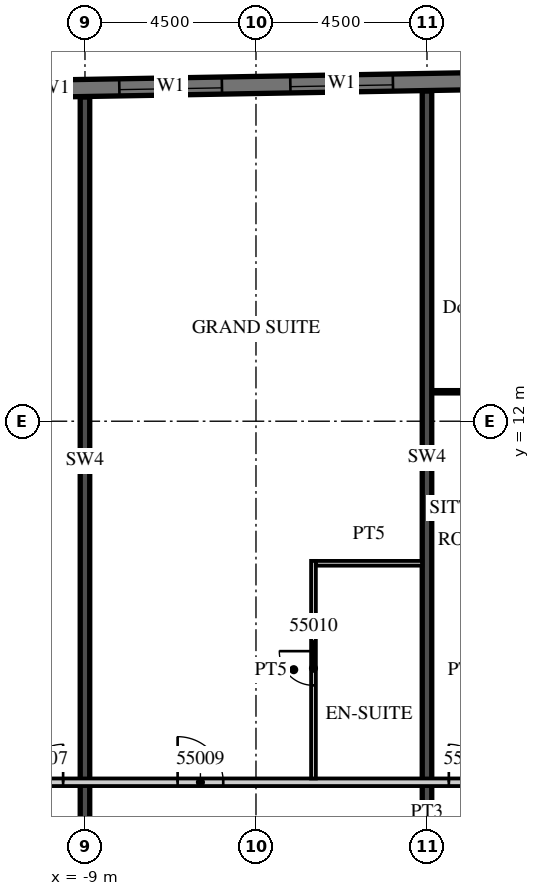
"""IFC4 building model, lengths in metres.
Left out: names, types, materials, properties, quantities, classifications, styles, units other than length and angle.
Written with IfcOpenShell. Run it as: python <this file> out.ifc"""

import sys

from ifc_helpers import new_model, si_unit, direction, frame, frame_2d, origin, place, context, subcontext, project, spatial, rectangle, extrude, element, fill, save


model = new_model("IFC4")
c1 = context("Model", 3, precision=1e-05, world=origin(), true_north=direction((0.0, 1.0)))
c2 = subcontext(c1, "Body", "Model", "MODEL_VIEW")
j1 = project(units=[si_unit("LENGTHUNIT", "METRE"), si_unit("PLANEANGLEUNIT", "RADIAN")], contexts=[c1])
p1 = place(None, origin())
s1 = spatial("IfcSite", under=j1, at=p1, CompositionType="ELEMENT")
p2 = place(p1, origin())
s2 = spatial("IfcBuilding", under=s1, at=p2, CompositionType="ELEMENT")
p3 = place(p2, frame((0.0, 0.0, 227.6)))
s3 = spatial("IfcBuildingStorey", under=s2, at=p3, CompositionType="ELEMENT", Elevation=227.6)
p4 = place(p3, frame((-9.0, 1.4, 0.0), z_axis=(0.0, 0.0, 1.0), x_axis=(0.0, 1.0, 0.0)))
e1 = element("IfcWall", 1, at=p4, inside=s3, PredefinedType="SHEAR", context=c2, shape_type="SweptSolid", body=[
    extrude(rectangle(XDim=19.132, YDim=0.25, at=frame_2d((9.566, 0.0))), origin(), (0.0, 0.0, 1.0), 3.3),
])
p5 = place(p3, frame((0.0, 1.4, 0.0), z_axis=(0.0, 0.0, 1.0), x_axis=(0.0, 1.0, 0.0)))
e2 = element("IfcWall", 2, at=p5, inside=s3, PredefinedType="SHEAR", context=c2, shape_type="SweptSolid", body=[
    extrude(rectangle(XDim=19.289, YDim=0.25, at=frame_2d((9.644, 0.0))), origin(), (0.0, 0.0, 1.0), 3.3),
])
p6 = place(p3, frame((13.504, 21.161, 0.0), z_axis=(0.0, 0.0, 1.0), x_axis=(-0.999847763257, -0.017448504532, 0.0)))
e3 = element("IfcWall", 3, at=p6, inside=s3, PredefinedType="SOLIDWALL", context=c2, shape_type="SweptSolid", body=[
    extrude(rectangle(XDim=46.859, YDim=0.45, at=frame_2d((23.43, 0.0))), origin(), (0.0, 0.0, 1.0), 3.02),
])
p7 = place(p6, frame((0.9, 0.0, 0.45)))
e4 = element("IfcOpeningElement", 4, at=p7, cuts=e3, PredefinedType="OPENING", context=c2, shape_type="SweptSolid", body=[
    extrude(rectangle(XDim=2.7, YDim=2.25, at=frame_2d((1.35, 1.125))), frame((0.0, 0.235, 0.0), z_axis=(0.0, -1.0, 0.0), x_axis=(1.0, 0.0, 0.0)), (0.0, 0.0, 1.0), 0.47),
])
p8 = place(p6, frame((5.401, 0.0, 0.45)))
e5 = element("IfcOpeningElement", 5, at=p8, cuts=e3, PredefinedType="OPENING", context=c2, shape_type="SweptSolid", body=[
    extrude(rectangle(XDim=2.7, YDim=2.25, at=frame_2d((1.35, 1.125))), frame((0.0, 0.235, 0.0), z_axis=(0.0, -1.0, 0.0), x_axis=(1.0, 0.0, 0.0)), (0.0, 0.0, 1.0), 0.47),
])
p9 = place(p6, frame((9.902, 0.0, 0.45)))
e6 = element("IfcOpeningElement", 6, at=p9, cuts=e3, PredefinedType="OPENING", context=c2, shape_type="SweptSolid", body=[
    extrude(rectangle(XDim=2.7, YDim=2.25, at=frame_2d((1.35, 1.125))), frame((0.0, 0.235, 0.0), z_axis=(0.0, -1.0, 0.0), x_axis=(1.0, 0.0, 0.0)), (0.0, 0.0, 1.0), 0.47),
])
p10 = place(p6, frame((14.402, 0.0, 0.45)))
e7 = element("IfcOpeningElement", 7, at=p10, cuts=e3, PredefinedType="OPENING", context=c2, shape_type="SweptSolid", body=[
    extrude(rectangle(XDim=2.7, YDim=2.25, at=frame_2d((1.35, 1.125))), frame((0.0, 0.235, 0.0), z_axis=(0.0, -1.0, 0.0), x_axis=(1.0, 0.0, 0.0)), (0.0, 0.0, 1.0), 0.47),
])
p11 = place(p6, frame((18.903, 0.0, 0.45)))
e8 = element("IfcOpeningElement", 8, at=p11, cuts=e3, PredefinedType="OPENING", context=c2, shape_type="SweptSolid", body=[
    extrude(rectangle(XDim=2.7, YDim=2.25, at=frame_2d((1.35, 1.125))), frame((0.0, 0.235, 0.0), z_axis=(0.0, -1.0, 0.0), x_axis=(1.0, 0.0, 0.0)), (0.0, 0.0, 1.0), 0.47),
])
p12 = place(p6, frame((23.404, 0.0, 0.45)))
e9 = element("IfcOpeningElement", 9, at=p12, cuts=e3, PredefinedType="OPENING", context=c2, shape_type="SweptSolid", body=[
    extrude(rectangle(XDim=2.7, YDim=2.25, at=frame_2d((1.35, 1.125))), frame((0.0, 0.235, 0.0), z_axis=(0.0, -1.0, 0.0), x_axis=(1.0, 0.0, 0.0)), (0.0, 0.0, 1.0), 0.47),
])
p13 = place(p6, frame((27.904, 0.0, 0.45)))
e10 = element("IfcOpeningElement", 10, at=p13, cuts=e3, PredefinedType="OPENING", context=c2, shape_type="SweptSolid", body=[
    extrude(rectangle(XDim=2.7, YDim=2.25, at=frame_2d((1.35, 1.125))), frame((0.0, 0.235, 0.0), z_axis=(0.0, -1.0, 0.0), x_axis=(1.0, 0.0, 0.0)), (0.0, 0.0, 1.0), 0.47),
])
p14 = place(p6, frame((32.405, 0.0, 0.45)))
e11 = element("IfcOpeningElement", 11, at=p14, cuts=e3, PredefinedType="OPENING", context=c2, shape_type="SweptSolid", body=[
    extrude(rectangle(XDim=2.7, YDim=2.25, at=frame_2d((1.35, 1.125))), frame((0.0, 0.235, 0.0), z_axis=(0.0, -1.0, 0.0), x_axis=(1.0, 0.0, 0.0)), (0.0, 0.0, 1.0), 0.47),
])
p15 = place(p6, frame((36.906, 0.0, 0.45)))
e12 = element("IfcOpeningElement", 12, at=p15, cuts=e3, PredefinedType="OPENING", context=c2, shape_type="SweptSolid", body=[
    extrude(rectangle(XDim=2.7, YDim=2.25, at=frame_2d((1.35, 1.125))), frame((0.0, 0.235, 0.0), z_axis=(0.0, -1.0, 0.0), x_axis=(1.0, 0.0, 0.0)), (0.0, 0.0, 1.0), 0.47),
])
p16 = place(p6, frame((41.406, 0.0, 0.45)))
e13 = element("IfcOpeningElement", 13, at=p16, cuts=e3, PredefinedType="OPENING", context=c2, shape_type="SweptSolid", body=[
    extrude(rectangle(XDim=2.7, YDim=2.25, at=frame_2d((1.35, 1.125))), frame((0.0, 0.235, 0.0), z_axis=(0.0, -1.0, 0.0), x_axis=(1.0, 0.0, 0.0)), (0.0, 0.0, 1.0), 0.47),
])
p17 = place(p3, frame((-13.5, 2.5, 0.0), z_axis=(0.0, 0.0, 1.0), x_axis=(1.0, 0.0, 0.0)))
e14 = element("IfcWall", 14, at=p17, inside=s3, PredefinedType="PARTITIONING", context=c2, shape_type="SweptSolid", body=[
    extrude(rectangle(XDim=27.0, YDim=0.2, at=frame_2d((13.5, 0.0))), origin(), (0.0, 0.0, 1.0), 3.02),
])
p18 = place(p17, frame((2.925, 0.0, 0.0)))
e15 = element("IfcOpeningElement", 15, at=p18, cuts=e14, PredefinedType="OPENING", context=c2, shape_type="SweptSolid", body=[
    extrude(rectangle(XDim=1.0, YDim=2.1, at=frame_2d((0.5, 1.05))), frame((0.0, 0.11, 0.0), z_axis=(0.0, -1.0, 0.0), x_axis=(1.0, 0.0, 0.0)), (0.0, 0.0, 1.0), 0.22),
])
p19 = place(p17, frame((6.938, 0.0, 0.0)))
e16 = element("IfcOpeningElement", 16, at=p19, cuts=e14, PredefinedType="OPENING", context=c2, shape_type="SweptSolid", body=[
    extrude(rectangle(XDim=1.2, YDim=2.1, at=frame_2d((0.6, 1.05))), frame((0.0, 0.11, 0.0), z_axis=(0.0, -1.0, 0.0), x_axis=(1.0, 0.0, 0.0)), (0.0, 0.0, 1.0), 0.22),
])
p20 = place(p17, frame((14.075, 0.0, 0.0)))
e17 = element("IfcOpeningElement", 17, at=p20, cuts=e14, PredefinedType="OPENING", context=c2, shape_type="SweptSolid", body=[
    extrude(rectangle(XDim=1.0, YDim=2.1, at=frame_2d((0.5, 1.05))), frame((0.0, 0.11, 0.0), z_axis=(0.0, -1.0, 0.0), x_axis=(1.0, 0.0, 0.0)), (0.0, 0.0, 1.0), 0.22),
])
p21 = place(p17, frame((20.925, 0.0, 0.0)))
e18 = element("IfcOpeningElement", 18, at=p21, cuts=e14, PredefinedType="OPENING", context=c2, shape_type="SweptSolid", body=[
    extrude(rectangle(XDim=1.0, YDim=2.1, at=frame_2d((0.5, 1.05))), frame((0.0, 0.11, 0.0), z_axis=(0.0, -1.0, 0.0), x_axis=(1.0, 0.0, 0.0)), (0.0, 0.0, 1.0), 0.22),
])
p22 = place(p17, frame((25.425, 0.0, 0.0)))
e19 = element("IfcOpeningElement", 19, at=p22, cuts=e14, PredefinedType="OPENING", context=c2, shape_type="SweptSolid", body=[
    extrude(rectangle(XDim=1.0, YDim=2.1, at=frame_2d((0.5, 1.05))), frame((0.0, 0.11, 0.0), z_axis=(0.0, -1.0, 0.0), x_axis=(1.0, 0.0, 0.0)), (0.0, 0.0, 1.0), 0.22),
])
p23 = place(p3, frame((-2.987, 2.6, 0.0), z_axis=(0.0, 0.0, 1.0), x_axis=(0.0, 1.0, 0.0)))
e20 = element("IfcWall", 20, at=p23, inside=s3, PredefinedType="PARTITIONING", context=c2, shape_type="SweptSolid", body=[
    extrude(rectangle(XDim=5.725, YDim=0.125, at=frame_2d((2.862, 0.0))), origin(), (0.0, 0.0, 1.0), 3.02),
])
p24 = place(p23, frame((2.45, 0.0, 0.0)))
e21 = element("IfcOpeningElement", 21, at=p24, cuts=e20, PredefinedType="OPENING", context=c2, shape_type="SweptSolid", body=[
    extrude(rectangle(XDim=0.9, YDim=2.1, at=frame_2d((0.45, 1.05))), frame((0.0, 0.073, 0.0), z_axis=(0.0, -1.0, 0.0), x_axis=(1.0, 0.0, 0.0)), (0.0, 0.0, 1.0), 0.145),
])
p25 = place(p3, frame((-2.925, 8.262, 0.0), z_axis=(0.0, 0.0, 1.0), x_axis=(1.0, 0.0, 0.0)))
e22 = element("IfcWall", 22, at=p25, inside=s3, PredefinedType="PARTITIONING", context=c2, shape_type="SweptSolid", body=[
    extrude(rectangle(XDim=2.8, YDim=0.125, at=frame_2d((1.4, 0.0))), origin(), (0.0, 0.0, 1.0), 3.02),
])
p26 = place(p3, frame((0.125, 12.775, 0.0), z_axis=(0.0, 0.0, 1.0), x_axis=(1.0, 0.0, 0.0)))
e23 = element("IfcWall", 23, at=p26, inside=s3, PredefinedType="PARTITIONING", context=c2, shape_type="SweptSolid", body=[
    extrude(rectangle(XDim=4.275, YDim=0.1, at=frame_2d((2.137, 0.0))), origin(), (0.0, 0.0, 1.0), 3.02),
])
p27 = place(p26, frame((1.388, 0.0, 0.0)))
e24 = element("IfcOpeningElement", 24, at=p27, cuts=e23, PredefinedType="OPENING", context=c2, shape_type="SweptSolid", body=[
    extrude(rectangle(XDim=1.5, YDim=2.1, at=frame_2d((0.75, 1.05))), frame((0.0, 0.06, 0.0), z_axis=(0.0, -1.0, 0.0), x_axis=(1.0, 0.0, 0.0)), (0.0, 0.0, 1.0), 0.12),
])
p28 = place(p10, origin())
e25 = element("IfcWindow", 25, at=p28, inside=s3, PartitioningType="SINGLE_PANEL", PredefinedType="WINDOW", context=c2, shape_type="SweptSolid", body=[
    extrude(rectangle(XDim=2.7, YDim=2.25, at=frame_2d((1.35, 1.125))), frame((0.0, 0.09, 0.0), z_axis=(0.0, -1.0, 0.0), x_axis=(1.0, 0.0, 0.0)), (0.0, 0.0, 1.0), 0.06),
])
fill(e7, e25)
p29 = place(p11, origin())
e26 = element("IfcWindow", 26, at=p29, inside=s3, PartitioningType="SINGLE_PANEL", PredefinedType="WINDOW", context=c2, shape_type="SweptSolid", body=[
    extrude(rectangle(XDim=2.7, YDim=2.25, at=frame_2d((1.35, 1.125))), frame((0.0, 0.09, 0.0), z_axis=(0.0, -1.0, 0.0), x_axis=(1.0, 0.0, 0.0)), (0.0, 0.0, 1.0), 0.06),
])
fill(e8, e26)
p30 = place(p18, origin())
e27 = element("IfcDoor", 27, at=p30, inside=s3, OperationType="SINGLE_SWING_RIGHT", PredefinedType="DOOR", context=c2, shape_type="SweptSolid", body=[
    extrude(rectangle(XDim=1.0, YDim=2.1, at=frame_2d((0.5, 1.05))), frame((0.0, 0.025, 0.0), z_axis=(0.0, -1.0, 0.0), x_axis=(1.0, 0.0, 0.0)), (0.0, 0.0, 1.0), 0.05),
])
fill(e15, e27)
p31 = place(p19, origin())
e28 = element("IfcDoor", 28, at=p31, inside=s3, OperationType="SINGLE_SWING_LEFT", PredefinedType="DOOR", context=c2, shape_type="SweptSolid", body=[
    extrude(rectangle(XDim=1.2, YDim=2.1, at=frame_2d((0.6, 1.05))), frame((0.0, 0.025, 0.0), z_axis=(0.0, -1.0, 0.0), x_axis=(1.0, 0.0, 0.0)), (0.0, 0.0, 1.0), 0.05),
])
fill(e16, e28)
p32 = place(p24, origin())
e29 = element("IfcDoor", 29, at=p32, inside=s3, OperationType="SINGLE_SWING_RIGHT", PredefinedType="DOOR", context=c2, shape_type="SweptSolid", body=[
    extrude(rectangle(XDim=0.9, YDim=2.1, at=frame_2d((0.45, 1.05))), frame((0.0, 0.025, 0.0), z_axis=(0.0, -1.0, 0.0), x_axis=(1.0, 0.0, 0.0)), (0.0, 0.0, 1.0), 0.05),
])
fill(e21, e29)
p33 = place(p20, origin())
e30 = element("IfcDoor", 30, at=p33, inside=s3, OperationType="SINGLE_SWING_LEFT", PredefinedType="DOOR", context=c2, shape_type="SweptSolid", body=[
    extrude(rectangle(XDim=1.0, YDim=2.1, at=frame_2d((0.5, 1.05))), frame((0.0, 0.025, 0.0), z_axis=(0.0, -1.0, 0.0), x_axis=(1.0, 0.0, 0.0)), (0.0, 0.0, 1.0), 0.05),
])
fill(e17, e30)
save(model, sys.argv[1])
